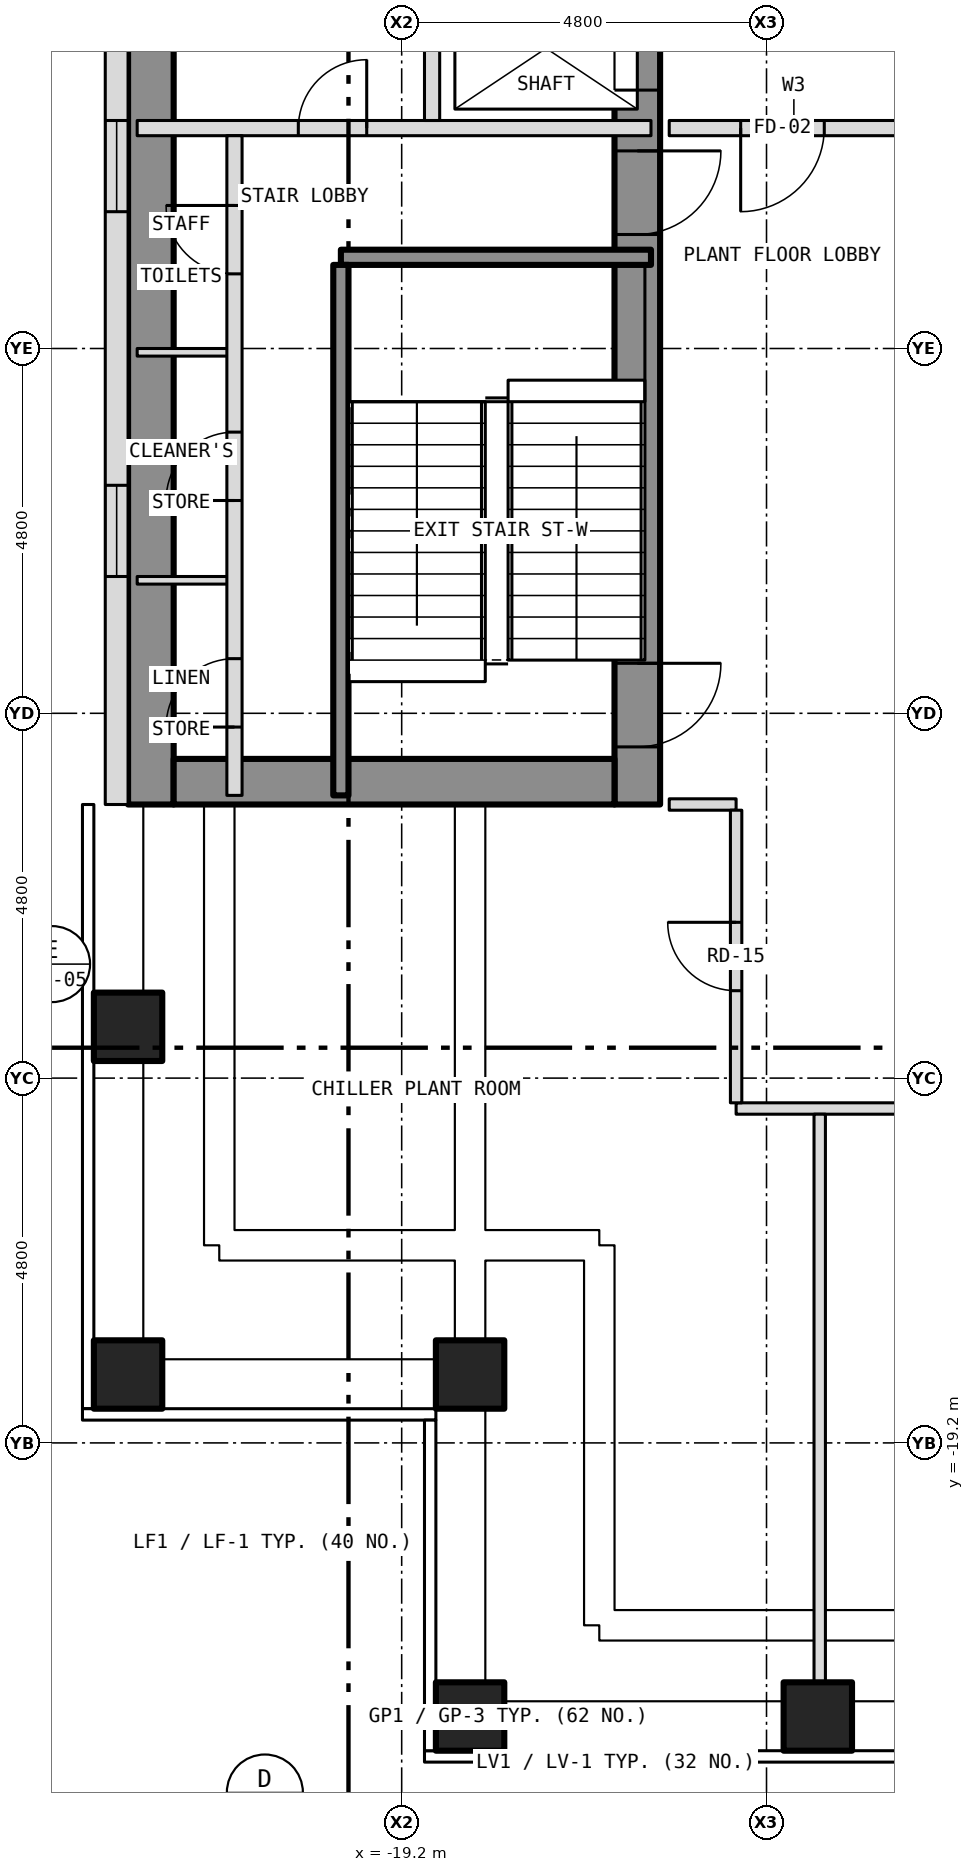
"""IFC4 building model, lengths in metres.
Left out: names, types, materials, properties, quantities, classifications, styles, units other than length and angle.
Written with IfcOpenShell. Run it as: python <this file> out.ifc"""

import sys

from ifc_helpers import new_model, si_unit, direction, frame, frame_2d, origin, origin_2d, place, context, subcontext, project, spatial, rectangle, hollow_rectangle, extrude, element, fill, save


model = new_model("IFC4")
c1 = context("Model", 3, precision=1e-05, world=origin(), true_north=direction((0.0, 1.0)))
c2 = subcontext(c1, "Body", "Model", "MODEL_VIEW")
j1 = project(units=[si_unit("LENGTHUNIT", "METRE"), si_unit("PLANEANGLEUNIT", "RADIAN")], contexts=[c1])
p1 = place(None, origin())
s1 = spatial("IfcSite", under=j1, at=p1, CompositionType="ELEMENT")
p2 = place(p1, origin())
s2 = spatial("IfcBuilding", under=s1, at=p2, CompositionType="ELEMENT")
p3 = place(p2, frame((0.0, 0.0, 138.0)))
s3 = spatial("IfcBuildingStorey", under=s2, at=p3, CompositionType="ELEMENT", Elevation=138.0)
for number, where, z_axis, x_axis in (
    (1, (-18.3, -22.8, -0.3), (0.0, 0.0, 1.0), (1.0, 0.0, 0.0)),
    (2, (-13.725, -22.8, -0.3), (0.0, 0.0, 1.0), (1.0, 0.0, 0.0)),
    (3, (-22.8, -18.3, -0.3), (0.0, 0.0, 1.0), (1.0, 0.0, 0.0)),
    (4, (-22.8, -13.725, -0.3), (0.0, 0.0, 1.0), (1.0, 0.0, 0.0)),
    (5, (-18.3, -18.3, -0.3), (0.0, 0.0, 1.0), (1.0, 0.0, 0.0)),
):
    element("IfcColumn", number, at=place(p3, frame(where, z_axis=z_axis, x_axis=x_axis)), inside=s3, PredefinedType="COLUMN", context=c2, shape_type="SweptSolid", body=[
        extrude(hollow_rectangle(XDim=0.9, YDim=0.9, WallThickness=0.05, at=origin_2d()), origin(), (0.0, 0.0, 1.0), 4.6),
    ])
p4 = place(p3, frame((-16.1, -10.8, 0.0), z_axis=(0.0, 0.0, 1.0), x_axis=(0.0, 1.0, 0.0)))
e6 = element("IfcWall", 6, at=p4, inside=s3, PredefinedType="SHEAR", context=c2, shape_type="SweptSolid", body=[
    extrude(rectangle(XDim=21.6, YDim=0.6, at=frame_2d((10.8, 0.0))), origin(), (0.0, 0.0, 1.0), 3.9),
])
p5 = place(p4, frame((9.4, 0.0, 0.0)))
e7 = element("IfcOpeningElement", 7, at=p5, cuts=e6, PredefinedType="OPENING", context=c2, shape_type="SweptSolid", body=[
    extrude(rectangle(XDim=1.1, YDim=2.1, at=frame_2d((0.55, 1.05))), frame((0.0, 0.312, 0.0), z_axis=(0.0, -1.0, 0.0), x_axis=(1.0, 0.0, 0.0)), (0.0, 0.0, 1.0), 0.624),
])
p6 = place(p4, frame((11.5, 0.0, 0.0)))
e8 = element("IfcOpeningElement", 8, at=p6, cuts=e6, PredefinedType="OPENING", context=c2, shape_type="SweptSolid", body=[
    extrude(rectangle(XDim=1.1, YDim=2.1, at=frame_2d((0.55, 1.05))), frame((0.0, 0.312, 0.0), z_axis=(0.0, -1.0, 0.0), x_axis=(1.0, 0.0, 0.0)), (0.0, 0.0, 1.0), 0.624),
])
p7 = place(p4, frame((0.758, 0.0, 0.0)))
e9 = element("IfcOpeningElement", 9, at=p7, cuts=e6, PredefinedType="OPENING", context=c2, shape_type="SweptSolid", body=[
    extrude(rectangle(XDim=1.1, YDim=2.1, at=frame_2d((0.55, 1.05))), frame((0.0, 0.312, 0.0), z_axis=(0.0, -1.0, 0.0), x_axis=(1.0, 0.0, 0.0)), (0.0, 0.0, 1.0), 0.624),
])
p8 = place(p4, frame((7.5, 0.0, 0.0)))
e10 = element("IfcOpeningElement", 10, at=p8, cuts=e6, PredefinedType="OPENING", context=c2, shape_type="SweptSolid", body=[
    extrude(rectangle(XDim=1.1, YDim=2.1, at=frame_2d((0.55, 1.05))), frame((0.0, 0.312, 0.0), z_axis=(0.0, -1.0, 0.0), x_axis=(1.0, 0.0, 0.0)), (0.0, 0.0, 1.0), 0.624),
])
p9 = place(p3, frame((-22.5, -10.8, 0.0), z_axis=(0.0, 0.0, 1.0), x_axis=(0.0, 1.0, 0.0)))
e11 = element("IfcWall", 11, at=p9, inside=s3, PredefinedType="SHEAR", context=c2, shape_type="SweptSolid", body=[
    extrude(rectangle(XDim=21.6, YDim=0.6, at=frame_2d((10.8, 0.0))), origin(), (0.0, 0.0, 1.0), 3.9),
])
p10 = place(p3, frame((-22.2, -10.5, 0.0), z_axis=(0.0, 0.0, 1.0), x_axis=(1.0, 0.0, 0.0)))
e12 = element("IfcWall", 12, at=p10, inside=s3, PredefinedType="SHEAR", context=c2, shape_type="SweptSolid", body=[
    extrude(rectangle(XDim=5.8, YDim=0.6, at=frame_2d((2.9, 0.0))), origin(), (0.0, 0.0, 1.0), 3.9),
])
p11 = place(p3, frame((-22.95, 10.8, 0.0), z_axis=(0.0, 0.0, 1.0), x_axis=(0.0, -1.0, 0.0)))
e13 = element("IfcWall", 13, at=p11, inside=s3, PredefinedType="SOLIDWALL", context=c2, shape_type="SweptSolid", body=[
    extrude(rectangle(XDim=21.6, YDim=0.3, at=frame_2d((10.8, 0.0))), origin(), (0.0, 0.0, 1.0), 4.5),
])
p12 = place(p11, frame((3.0, 0.0, 2.2)))
e14 = element("IfcOpeningElement", 14, at=p12, cuts=e13, PredefinedType="OPENING", context=c2, shape_type="SweptSolid", body=[
    extrude(rectangle(XDim=1.2, YDim=0.6, at=frame_2d((0.6, 0.3))), frame((0.0, 0.162, 0.0), z_axis=(0.0, -1.0, 0.0), x_axis=(1.0, 0.0, 0.0)), (0.0, 0.0, 1.0), 0.324),
])
p13 = place(p11, frame((7.8, 0.0, 2.2)))
e15 = element("IfcOpeningElement", 15, at=p13, cuts=e13, PredefinedType="OPENING", context=c2, shape_type="SweptSolid", body=[
    extrude(rectangle(XDim=1.2, YDim=0.6, at=frame_2d((0.6, 0.3))), frame((0.0, 0.162, 0.0), z_axis=(0.0, -1.0, 0.0), x_axis=(1.0, 0.0, 0.0)), (0.0, 0.0, 1.0), 0.324),
])
p14 = place(p11, frame((12.6, 0.0, 2.2)))
e16 = element("IfcOpeningElement", 16, at=p14, cuts=e13, PredefinedType="OPENING", context=c2, shape_type="SweptSolid", body=[
    extrude(rectangle(XDim=1.2, YDim=0.6, at=frame_2d((0.6, 0.3))), frame((0.0, 0.162, 0.0), z_axis=(0.0, -1.0, 0.0), x_axis=(1.0, 0.0, 0.0)), (0.0, 0.0, 1.0), 0.324),
])
p15 = place(p11, frame((17.4, 0.0, 2.2)))
e17 = element("IfcOpeningElement", 17, at=p15, cuts=e13, PredefinedType="OPENING", context=c2, shape_type="SweptSolid", body=[
    extrude(rectangle(XDim=1.2, YDim=0.6, at=frame_2d((0.6, 0.3))), frame((0.0, 0.162, 0.0), z_axis=(0.0, -1.0, 0.0), x_axis=(1.0, 0.0, 0.0)), (0.0, 0.0, 1.0), 0.324),
])
p16 = place(p3, frame((-14.8, -14.8, 0.0), z_axis=(0.0, 0.0, 1.0), x_axis=(1.0, 0.0, 0.0)))
e18 = element("IfcWall", 18, at=p16, inside=s3, PredefinedType="PARTITIONING", context=c2, shape_type="SweptSolid", body=[
    extrude(rectangle(XDim=29.6, YDim=0.15, at=frame_2d((14.8, 0.0))), origin(), (0.0, 0.0, 1.0), 4.3),
])
p17 = place(p16, frame((7.488, 0.0, 0.0)))
e19 = element("IfcOpeningElement", 19, at=p17, cuts=e18, PredefinedType="OPENING", context=c2, shape_type="SweptSolid", body=[
    extrude(rectangle(XDim=0.9, YDim=2.1, at=frame_2d((0.45, 1.05))), frame((0.0, 0.087, 0.0), z_axis=(0.0, -1.0, 0.0), x_axis=(1.0, 0.0, 0.0)), (0.0, 0.0, 1.0), 0.174),
])
p18 = place(p16, frame((21.213, 0.0, 0.0)))
e20 = element("IfcOpeningElement", 20, at=p18, cuts=e18, PredefinedType="OPENING", context=c2, shape_type="SweptSolid", body=[
    extrude(rectangle(XDim=0.9, YDim=2.1, at=frame_2d((0.45, 1.05))), frame((0.0, 0.087, 0.0), z_axis=(0.0, -1.0, 0.0), x_axis=(1.0, 0.0, 0.0)), (0.0, 0.0, 1.0), 0.174),
])
p19 = place(p3, frame((-15.68, -10.8, 0.0), z_axis=(0.0, 0.0, 1.0), x_axis=(1.0, 0.0, 0.0)))
e21 = element("IfcWall", 21, at=p19, inside=s3, PredefinedType="PARTITIONING", context=c2, shape_type="SweptSolid", body=[
    extrude(rectangle(XDim=0.88, YDim=0.15, at=frame_2d((0.44, 0.0))), origin(), (0.0, 0.0, 1.0), 4.3),
])
for number, where, z_axis, x_axis in (
    (22, (-22.68, -7.85, 0.0), (0.0, 0.0, 1.0), (1.0, 0.0, 0.0)),
    (23, (-22.68, -4.85, 0.0), (0.0, 0.0, 1.0), (1.0, 0.0, 0.0)),
):
    element("IfcWall", number, at=place(p3, frame(where, z_axis=z_axis, x_axis=x_axis)), inside=s3, PredefinedType="PARTITIONING", context=c2, shape_type="SweptSolid", body=[
        extrude(rectangle(XDim=1.28, YDim=0.1, at=frame_2d((0.64, 0.0))), origin(), (0.0, 0.0, 1.0), 3.9),
    ])
p20 = place(p3, frame((-20.0, -3.6, 0.0), z_axis=(0.0, 0.0, 1.0), x_axis=(1.0, 0.0, 0.0)))
e24 = element("IfcWall", 24, at=p20, inside=s3, PredefinedType="SHEAR", context=c2, shape_type="SweptSolid", body=[
    extrude(rectangle(XDim=4.08, YDim=0.2, at=frame_2d((2.04, 0.0))), origin(), (0.0, 0.0, 1.0), 3.9),
])
p21 = place(p3, frame((-22.68, -1.9, 0.0), z_axis=(0.0, 0.0, 1.0), x_axis=(1.0, 0.0, 0.0)))
e25 = element("IfcWall", 25, at=p21, inside=s3, PredefinedType="PARTITIONING", context=c2, shape_type="SweptSolid", body=[
    extrude(rectangle(XDim=6.76, YDim=0.2, at=frame_2d((3.38, 0.0))), origin(), (0.0, 0.0, 1.0), 3.9),
])
p22 = place(p21, frame((2.12, 0.0, 0.0)))
e26 = element("IfcOpeningElement", 26, at=p22, cuts=e25, PredefinedType="OPENING", context=c2, shape_type="SweptSolid", body=[
    extrude(rectangle(XDim=0.9, YDim=2.1, at=frame_2d((0.45, 1.05))), frame((0.0, 0.112, 0.0), z_axis=(0.0, -1.0, 0.0), x_axis=(1.0, 0.0, 0.0)), (0.0, 0.0, 1.0), 0.224),
])
p23 = place(p3, frame((-15.68, -1.9, 0.0), z_axis=(0.0, 0.0, 1.0), x_axis=(1.0, 0.0, 0.0)))
e27 = element("IfcWall", 27, at=p23, inside=s3, PredefinedType="PARTITIONING", context=c2, shape_type="SweptSolid", body=[
    extrude(rectangle(XDim=3.28, YDim=0.2, at=frame_2d((1.64, 0.0))), origin(), (0.0, 0.0, 1.0), 4.3),
])
p24 = place(p23, frame((0.94, 0.0, 0.0)))
e28 = element("IfcOpeningElement", 28, at=p24, cuts=e27, PredefinedType="OPENING", context=c2, shape_type="SweptSolid", body=[
    extrude(rectangle(XDim=1.1, YDim=2.1, at=frame_2d((0.55, 1.05))), frame((0.0, 0.112, 0.0), z_axis=(0.0, -1.0, 0.0), x_axis=(1.0, 0.0, 0.0)), (0.0, 0.0, 1.0), 0.224),
])
p25 = place(p3, frame((-21.4, -10.68, 0.0), z_axis=(0.0, 0.0, 1.0), x_axis=(0.0, 1.0, 0.0)))
e29 = element("IfcWall", 29, at=p25, inside=s3, PredefinedType="PARTITIONING", context=c2, shape_type="SweptSolid", body=[
    extrude(rectangle(XDim=8.68, YDim=0.2, at=frame_2d((4.34, 0.0))), origin(), (0.0, 0.0, 1.0), 3.9),
])
p26 = place(p25, frame((0.899, 0.0, 0.0)))
e30 = element("IfcOpeningElement", 30, at=p26, cuts=e29, PredefinedType="OPENING", context=c2, shape_type="SweptSolid", body=[
    extrude(rectangle(XDim=0.9, YDim=2.1, at=frame_2d((0.45, 1.05))), frame((0.0, 0.112, 0.0), z_axis=(0.0, -1.0, 0.0), x_axis=(1.0, 0.0, 0.0)), (0.0, 0.0, 1.0), 0.224),
])
p27 = place(p25, frame((3.88, 0.0, 0.0)))
e31 = element("IfcOpeningElement", 31, at=p27, cuts=e29, PredefinedType="OPENING", context=c2, shape_type="SweptSolid", body=[
    extrude(rectangle(XDim=0.9, YDim=2.1, at=frame_2d((0.45, 1.05))), frame((0.0, 0.112, 0.0), z_axis=(0.0, -1.0, 0.0), x_axis=(1.0, 0.0, 0.0)), (0.0, 0.0, 1.0), 0.224),
])
p28 = place(p25, frame((6.862, 0.0, 0.0)))
e32 = element("IfcOpeningElement", 32, at=p28, cuts=e29, PredefinedType="OPENING", context=c2, shape_type="SweptSolid", body=[
    extrude(rectangle(XDim=0.9, YDim=2.1, at=frame_2d((0.45, 1.05))), frame((0.0, 0.112, 0.0), z_axis=(0.0, -1.0, 0.0), x_axis=(1.0, 0.0, 0.0)), (0.0, 0.0, 1.0), 0.224),
])
p29 = place(p3, frame((-20.0, -10.68, 0.0), z_axis=(0.0, 0.0, 1.0), x_axis=(0.0, 1.0, 0.0)))
e33 = element("IfcWall", 33, at=p29, inside=s3, PredefinedType="SHEAR", context=c2, shape_type="SweptSolid", body=[
    extrude(rectangle(XDim=6.98, YDim=0.2, at=frame_2d((3.49, 0.0))), origin(), (0.0, 0.0, 1.0), 3.9),
])
p30 = place(p3, frame((-18.8, -1.8, 0.0), z_axis=(0.0, 0.0, 1.0), x_axis=(0.0, 1.0, 0.0)))
e34 = element("IfcWall", 34, at=p30, inside=s3, PredefinedType="PARTITIONING", context=c2, shape_type="SweptSolid", body=[
    extrude(rectangle(XDim=12.48, YDim=0.2, at=frame_2d((6.24, 0.0))), origin(), (0.0, 0.0, 1.0), 3.9),
])
p31 = place(p3, frame((-14.8, -14.725, 0.0), z_axis=(0.0, 0.0, 1.0), x_axis=(0.0, 1.0, 0.0)))
e35 = element("IfcWall", 35, at=p31, inside=s3, PredefinedType="PARTITIONING", context=c2, shape_type="SweptSolid", body=[
    extrude(rectangle(XDim=3.85, YDim=0.15, at=frame_2d((1.925, 0.0))), origin(), (0.0, 0.0, 1.0), 4.3),
])
p32 = place(p31, frame((1.475, 0.0, 0.0)))
e36 = element("IfcOpeningElement", 36, at=p32, cuts=e35, PredefinedType="OPENING", context=c2, shape_type="SweptSolid", body=[
    extrude(rectangle(XDim=0.9, YDim=2.1, at=frame_2d((0.45, 1.05))), frame((0.0, 0.087, 0.0), z_axis=(0.0, -1.0, 0.0), x_axis=(1.0, 0.0, 0.0)), (0.0, 0.0, 1.0), 0.174),
])
p33 = place(p3, frame((-13.7, -22.68, 0.0), z_axis=(0.0, 0.0, 1.0), x_axis=(0.0, 1.0, 0.0)))
e37 = element("IfcWall", 37, at=p33, inside=s3, PredefinedType="PARTITIONING", context=c2, shape_type="SweptSolid", body=[
    extrude(rectangle(XDim=7.805, YDim=0.15, at=frame_2d((3.902, 0.0))), origin(), (0.0, 0.0, 1.0), 4.3),
])
p34 = place(p14, origin())
e38 = element("IfcWindow", 38, at=p34, inside=s3, PartitioningType="SINGLE_PANEL", PredefinedType="WINDOW", context=c2, shape_type="SweptSolid", body=[
    extrude(rectangle(XDim=1.2, YDim=0.6, at=frame_2d((0.6, 0.3))), frame((0.0, -0.06, 0.0), z_axis=(0.0, -1.0, 0.0), x_axis=(1.0, 0.0, 0.0)), (0.0, 0.0, 1.0), 0.06),
])
fill(e16, e38)
p35 = place(p15, origin())
e39 = element("IfcWindow", 39, at=p35, inside=s3, PartitioningType="SINGLE_PANEL", PredefinedType="WINDOW", context=c2, shape_type="SweptSolid", body=[
    extrude(rectangle(XDim=1.2, YDim=0.6, at=frame_2d((0.6, 0.3))), frame((0.0, -0.06, 0.0), z_axis=(0.0, -1.0, 0.0), x_axis=(1.0, 0.0, 0.0)), (0.0, 0.0, 1.0), 0.06),
])
fill(e17, e39)
p36 = place(p5, origin())
e40 = element("IfcDoor", 40, at=p36, inside=s3, OperationType="SLIDING_TO_LEFT", PredefinedType="DOOR", context=c2, shape_type="SweptSolid", body=[
    extrude(rectangle(XDim=1.1, YDim=2.1, at=frame_2d((0.55, 1.05))), frame((0.0, 0.025, 0.0), z_axis=(0.0, -1.0, 0.0), x_axis=(1.0, 0.0, 0.0)), (0.0, 0.0, 1.0), 0.05),
])
fill(e7, e40)
p37 = place(p7, origin())
e41 = element("IfcDoor", 41, at=p37, inside=s3, OperationType="SINGLE_SWING_RIGHT", PredefinedType="DOOR", context=c2, shape_type="SweptSolid", body=[
    extrude(rectangle(XDim=1.1, YDim=2.1, at=frame_2d((0.55, 1.05))), frame((0.0, 0.025, 0.0), z_axis=(0.0, -1.0, 0.0), x_axis=(1.0, 0.0, 0.0)), (0.0, 0.0, 1.0), 0.05),
])
fill(e9, e41)
p38 = place(p8, origin())
e42 = element("IfcDoor", 42, at=p38, inside=s3, OperationType="SINGLE_SWING_RIGHT", PredefinedType="DOOR", context=c2, shape_type="SweptSolid", body=[
    extrude(rectangle(XDim=1.1, YDim=2.1, at=frame_2d((0.55, 1.05))), frame((0.0, 0.025, 0.0), z_axis=(0.0, -1.0, 0.0), x_axis=(1.0, 0.0, 0.0)), (0.0, 0.0, 1.0), 0.05),
])
fill(e10, e42)
p39 = place(p26, origin())
e43 = element("IfcDoor", 43, at=p39, inside=s3, OperationType="SINGLE_SWING_LEFT", PredefinedType="DOOR", context=c2, shape_type="SweptSolid", body=[
    extrude(rectangle(XDim=0.9, YDim=2.1, at=frame_2d((0.45, 1.05))), frame((0.0, 0.025, 0.0), z_axis=(0.0, -1.0, 0.0), x_axis=(1.0, 0.0, 0.0)), (0.0, 0.0, 1.0), 0.05),
])
fill(e30, e43)
p40 = place(p27, origin())
e44 = element("IfcDoor", 44, at=p40, inside=s3, OperationType="SINGLE_SWING_LEFT", PredefinedType="DOOR", context=c2, shape_type="SweptSolid", body=[
    extrude(rectangle(XDim=0.9, YDim=2.1, at=frame_2d((0.45, 1.05))), frame((0.0, 0.025, 0.0), z_axis=(0.0, -1.0, 0.0), x_axis=(1.0, 0.0, 0.0)), (0.0, 0.0, 1.0), 0.05),
])
fill(e31, e44)
p41 = place(p28, origin())
e45 = element("IfcDoor", 45, at=p41, inside=s3, OperationType="SINGLE_SWING_RIGHT", PredefinedType="DOOR", context=c2, shape_type="SweptSolid", body=[
    extrude(rectangle(XDim=0.9, YDim=2.1, at=frame_2d((0.45, 1.05))), frame((0.0, 0.025, 0.0), z_axis=(0.0, -1.0, 0.0), x_axis=(1.0, 0.0, 0.0)), (0.0, 0.0, 1.0), 0.05),
])
fill(e32, e45)
p42 = place(p22, origin())
e46 = element("IfcDoor", 46, at=p42, inside=s3, OperationType="SINGLE_SWING_RIGHT", PredefinedType="DOOR", context=c2, shape_type="SweptSolid", body=[
    extrude(rectangle(XDim=0.9, YDim=2.1, at=frame_2d((0.45, 1.05))), frame((0.0, 0.025, 0.0), z_axis=(0.0, -1.0, 0.0), x_axis=(1.0, 0.0, 0.0)), (0.0, 0.0, 1.0), 0.05),
])
fill(e26, e46)
p43 = place(p24, origin())
e47 = element("IfcDoor", 47, at=p43, inside=s3, OperationType="SINGLE_SWING_LEFT", PredefinedType="DOOR", context=c2, shape_type="SweptSolid", body=[
    extrude(rectangle(XDim=1.1, YDim=2.1, at=frame_2d((0.55, 1.05))), frame((0.0, 0.025, 0.0), z_axis=(0.0, -1.0, 0.0), x_axis=(1.0, 0.0, 0.0)), (0.0, 0.0, 1.0), 0.05),
])
fill(e28, e47)
p44 = place(p32, origin())
e48 = element("IfcDoor", 48, at=p44, inside=s3, OperationType="SINGLE_SWING_RIGHT", PredefinedType="DOOR", context=c2, shape_type="SweptSolid", body=[
    extrude(rectangle(XDim=0.9, YDim=2.1, at=frame_2d((0.45, 1.05))), frame((0.0, 0.025, 0.0), z_axis=(0.0, -1.0, 0.0), x_axis=(1.0, 0.0, 0.0)), (0.0, 0.0, 1.0), 0.05),
])
fill(e36, e48)
save(model, sys.argv[1])
